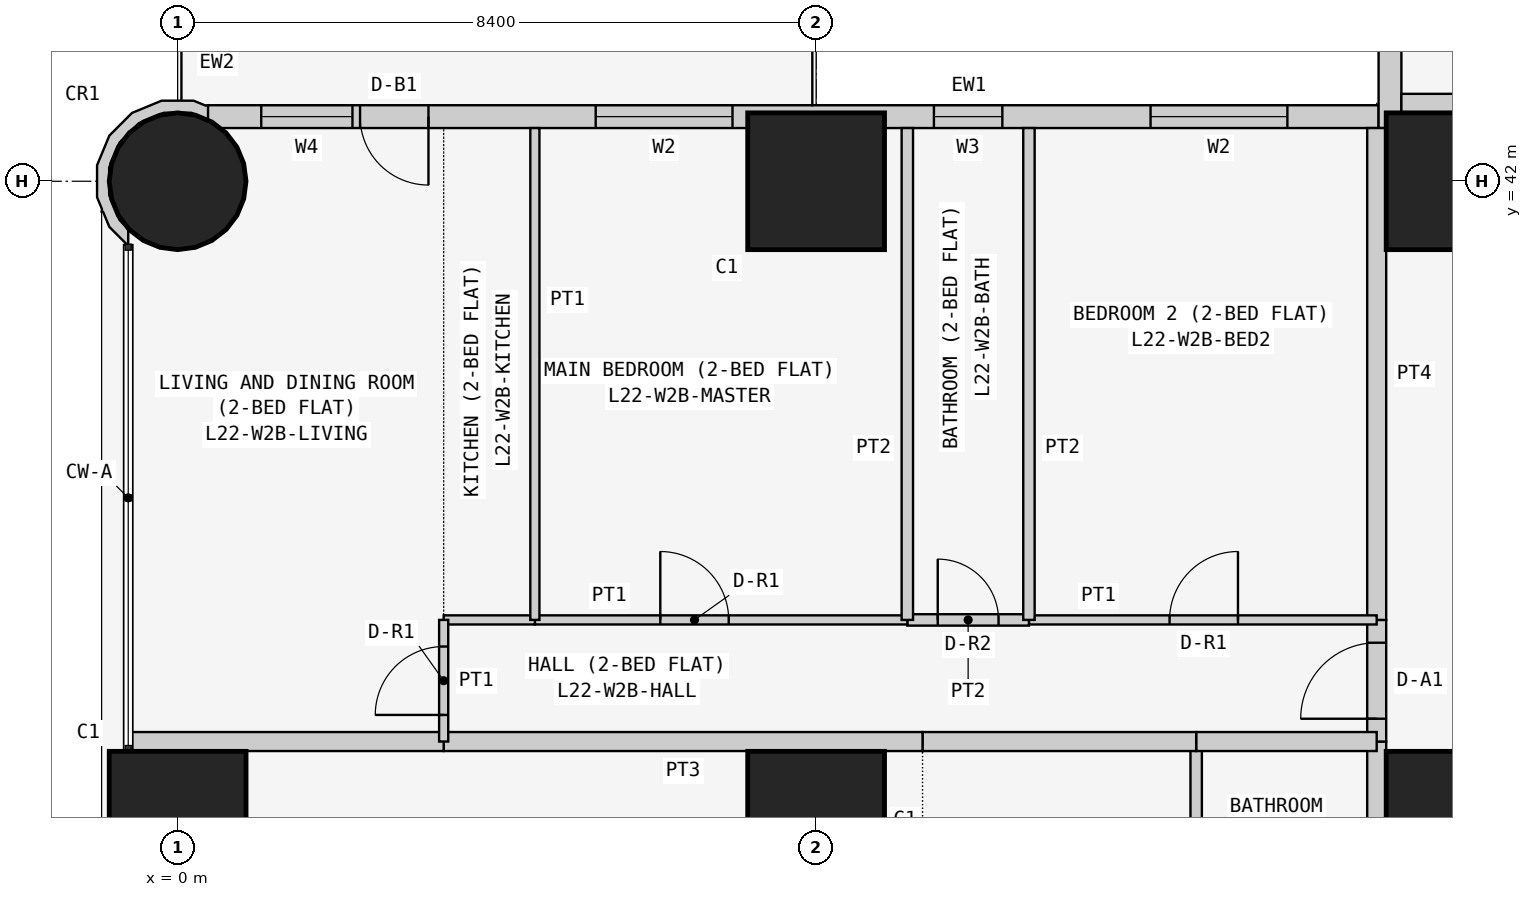
"""IFC4 building model, lengths in metres.
Left out: names, types, materials, properties, quantities, classifications, styles, units other than length and angle.
Written with IfcOpenShell. Run it as: python <this file> out.ifc"""

import sys

from ifc_helpers import new_model, si_unit, direction, frame, frame_2d, origin, origin_2d, place, context, subcontext, project, spatial, polyline, rectangle, circle, outline, extrude, element, fill, save


model = new_model("IFC4")
c1 = context("Model", 3, precision=1e-05, world=origin(), true_north=direction((0.0, 1.0)))
c2 = subcontext(c1, "Body", "Model", "MODEL_VIEW")
j1 = project(units=[si_unit("LENGTHUNIT", "METRE"), si_unit("PLANEANGLEUNIT", "RADIAN")], contexts=[c1])
p1 = place(None, origin())
s1 = spatial("IfcSite", under=j1, at=p1, CompositionType="ELEMENT")
p2 = place(p1, origin())
s2 = spatial("IfcBuilding", under=s1, at=p2, CompositionType="ELEMENT")
p3 = place(p2, frame((0.0, 0.0, 88.5)))
s3 = spatial("IfcBuildingStorey", under=s2, at=p3, CompositionType="ELEMENT", Elevation=88.5)
p4 = place(p3, frame((0.0, 33.6, 0.0), z_axis=(0.0, 0.0, 1.0), x_axis=(1.0, 0.0, 0.0)))
e1 = element("IfcColumn", 1, at=p4, inside=s3, PredefinedType="COLUMN", context=c2, shape_type="SweptSolid", body=[
    extrude(rectangle(XDim=1.8, YDim=1.8, at=origin_2d()), origin(), (0.0, 0.0, 1.0), 3.6),
])
p5 = place(p3, frame((0.0, 42.0, 0.0), z_axis=(0.0, 0.0, 1.0), x_axis=(1.0, 0.0, 0.0)))
e2 = element("IfcColumn", 2, at=p5, inside=s3, PredefinedType="COLUMN", context=c2, shape_type="SweptSolid", body=[
    extrude(circle(Radius=0.9, at=origin_2d()), origin(), (0.0, 0.0, 1.0), 3.6),
])
for number, where, z_axis, x_axis in (
    (3, (8.4, 33.6, 0.0), (0.0, 0.0, 1.0), (1.0, 0.0, 0.0)),
    (4, (8.4, 42.0, 0.0), (0.0, 0.0, 1.0), (1.0, 0.0, 0.0)),
    (5, (16.8, 33.6, 0.0), (0.0, 0.0, 1.0), (1.0, 0.0, 0.0)),
    (6, (16.8, 42.0, 0.0), (0.0, 0.0, 1.0), (1.0, 0.0, 0.0)),
):
    element("IfcColumn", number, at=place(p3, frame(where, z_axis=z_axis, x_axis=x_axis)), inside=s3, PredefinedType="COLUMN", context=c2, shape_type="SweptSolid", body=[
        extrude(rectangle(XDim=1.8, YDim=1.8, at=origin_2d()), origin(), (0.0, 0.0, 1.0), 3.6),
    ])
p6 = place(p3, frame((15.8, 42.85, 0.0), z_axis=(0.0, 0.0, 1.0), x_axis=(-1.0, 0.0, 0.0)))
e7 = element("IfcWall", 7, at=p6, inside=s3, PredefinedType="SOLIDWALL", context=c2, shape_type="SweptSolid", body=[
    extrude(rectangle(XDim=15.4, YDim=0.3, at=frame_2d((7.7, 0.0))), origin(), (0.0, 0.0, 1.0), 3.45),
])
p7 = place(p6, frame((1.2, 0.0, 0.9)))
e8 = element("IfcOpeningElement", 8, at=p7, cuts=e7, PredefinedType="OPENING", context=c2, shape_type="SweptSolid", body=[
    extrude(rectangle(XDim=1.8, YDim=1.5, at=frame_2d((0.9, 0.75))), frame((0.0, 0.16, 0.0), z_axis=(0.0, -1.0, 0.0), x_axis=(1.0, 0.0, 0.0)), (0.0, 0.0, 1.0), 0.32),
])
p8 = place(p6, frame((4.95, 0.0, 1.5)))
e9 = element("IfcOpeningElement", 9, at=p8, cuts=e7, PredefinedType="OPENING", context=c2, shape_type="SweptSolid", body=[
    extrude(rectangle(XDim=0.9, YDim=0.7, at=frame_2d((0.45, 0.35))), frame((0.0, 0.16, 0.0), z_axis=(0.0, -1.0, 0.0), x_axis=(1.0, 0.0, 0.0)), (0.0, 0.0, 1.0), 0.32),
])
p9 = place(p6, frame((8.5, 0.0, 0.9)))
e10 = element("IfcOpeningElement", 10, at=p9, cuts=e7, PredefinedType="OPENING", context=c2, shape_type="SweptSolid", body=[
    extrude(rectangle(XDim=1.8, YDim=1.5, at=frame_2d((0.9, 0.75))), frame((0.0, 0.16, 0.0), z_axis=(0.0, -1.0, 0.0), x_axis=(1.0, 0.0, 0.0)), (0.0, 0.0, 1.0), 0.32),
])
p10 = place(p6, frame((12.5, 0.0, 0.0)))
e11 = element("IfcOpeningElement", 11, at=p10, cuts=e7, PredefinedType="OPENING", context=c2, shape_type="SweptSolid", body=[
    extrude(rectangle(XDim=0.9, YDim=2.4, at=frame_2d((0.45, 1.2))), frame((0.0, 0.16, 0.0), z_axis=(0.0, -1.0, 0.0), x_axis=(1.0, 0.0, 0.0)), (0.0, 0.0, 1.0), 0.32),
])
p11 = place(p6, frame((13.5, 0.0, 0.9)))
e12 = element("IfcOpeningElement", 12, at=p11, cuts=e7, PredefinedType="OPENING", context=c2, shape_type="SweptSolid", body=[
    extrude(rectangle(XDim=1.2, YDim=1.5, at=frame_2d((0.6, 0.75))), frame((0.0, 0.16, 0.0), z_axis=(0.0, -1.0, 0.0), x_axis=(1.0, 0.0, 0.0)), (0.0, 0.0, 1.0), 0.32),
])
p12 = place(p3, frame((15.95, 58.4, 0.0), z_axis=(0.0, 0.0, 1.0), x_axis=(0.0, -1.0, 0.0)))
e13 = element("IfcWall", 13, at=p12, inside=s3, PredefinedType="SOLIDWALL", context=c2, shape_type="SweptSolid", body=[
    extrude(rectangle(XDim=15.7, YDim=0.3, at=frame_2d((7.85, 0.0))), origin(), (0.0, 0.0, 1.0), 3.45),
])
p13 = place(p12, frame((12.4, 0.0, 0.9)))
e14 = element("IfcOpeningElement", 14, at=p13, cuts=e13, PredefinedType="OPENING", context=c2, shape_type="SweptSolid", body=[
    extrude(rectangle(XDim=1.8, YDim=1.5, at=frame_2d((0.9, 0.75))), frame((0.0, 0.16, 0.0), z_axis=(0.0, -1.0, 0.0), x_axis=(1.0, 0.0, 0.0)), (0.0, 0.0, 1.0), 0.32),
])
p14 = place(p12, frame((9.55, 0.0, 1.5)))
e15 = element("IfcOpeningElement", 15, at=p14, cuts=e13, PredefinedType="OPENING", context=c2, shape_type="SweptSolid", body=[
    extrude(rectangle(XDim=0.9, YDim=0.7, at=frame_2d((0.45, 0.35))), frame((0.0, 0.16, 0.0), z_axis=(0.0, -1.0, 0.0), x_axis=(1.0, 0.0, 0.0)), (0.0, 0.0, 1.0), 0.32),
])
p15 = place(p12, frame((5.1, 0.0, 0.9)))
e16 = element("IfcOpeningElement", 16, at=p15, cuts=e13, PredefinedType="OPENING", context=c2, shape_type="SweptSolid", body=[
    extrude(rectangle(XDim=1.8, YDim=1.5, at=frame_2d((0.9, 0.75))), frame((0.0, 0.16, 0.0), z_axis=(0.0, -1.0, 0.0), x_axis=(1.0, 0.0, 0.0)), (0.0, 0.0, 1.0), 0.32),
])
p16 = place(p12, frame((2.0, 0.0, 0.0)))
e17 = element("IfcOpeningElement", 17, at=p16, cuts=e13, PredefinedType="OPENING", context=c2, shape_type="SweptSolid", body=[
    extrude(rectangle(XDim=0.9, YDim=2.4, at=frame_2d((0.45, 1.2))), frame((0.0, 0.16, 0.0), z_axis=(0.0, -1.0, 0.0), x_axis=(1.0, 0.0, 0.0)), (0.0, 0.0, 1.0), 0.32),
])
p17 = place(p12, frame((0.7, 0.0, 0.9)))
e18 = element("IfcOpeningElement", 18, at=p17, cuts=e13, PredefinedType="OPENING", context=c2, shape_type="SweptSolid", body=[
    extrude(rectangle(XDim=1.2, YDim=1.5, at=frame_2d((0.6, 0.75))), frame((0.0, 0.16, 0.0), z_axis=(0.0, -1.0, 0.0), x_axis=(1.0, 0.0, 0.0)), (0.0, 0.0, 1.0), 0.32),
])
p18 = place(p3, frame((0.364, 42.91, 0.0), z_axis=(0.0, 0.0, 1.0), x_axis=(-0.926129809145, 0.377204953059, 0.0)))
e19 = element("IfcWall", 19, at=p18, inside=s3, PredefinedType="SOLIDWALL", context=c2, shape_type="SweptSolid", body=[
    extrude(outline(polyline([(0.36, 1.803), (0.509, 1.741), (0.761, 1.486), (0.896, 1.154), (0.894, 0.795), (0.755, 0.465), (0.5, 0.213), (0.168, 0.078), (-0.1, 0.08), (0.001, -0.097), (0.03, -0.08), (0.199, -0.081), (0.589, 0.078), (0.889, 0.374), (1.053, 0.763), (1.055, 1.185), (0.896, 1.575), (0.778, 1.695), (0.769, 1.728), (0.75, 1.723), (0.6, 1.875), (0.295, 2.003), (0.281, 1.998), (0.36, 1.803)])), origin(), (0.0, 0.0, 1.0), 3.45),
])
p19 = place(p3, frame((16.1, 43.025, 0.0), z_axis=(0.0, 0.0, 1.0), x_axis=(1.0, 0.0, 0.0)))
e20 = element("IfcWall", 20, at=p19, inside=s3, PredefinedType="PARTITIONING", context=c2, shape_type="SweptSolid", body=[
    extrude(rectangle(XDim=6.471, YDim=0.25, at=frame_2d((3.235, 0.0))), origin(), (0.0, 0.0, 1.0), 3.45),
])
p20 = place(p3, frame((15.775, 32.0, 0.0), z_axis=(0.0, 0.0, 1.0), x_axis=(0.0, 1.0, 0.0)))
e21 = element("IfcWall", 21, at=p20, inside=s3, PredefinedType="PARTITIONING", context=c2, shape_type="SweptSolid", body=[
    extrude(rectangle(XDim=2.629, YDim=0.25, at=frame_2d((1.314, 0.0))), origin(), (0.0, 0.0, 1.0), 3.45),
])
p21 = place(p3, frame((15.775, 34.629, 0.0), z_axis=(0.0, 0.0, 1.0), x_axis=(0.0, 1.0, 0.0)))
e22 = element("IfcWall", 22, at=p21, inside=s3, PredefinedType="PARTITIONING", context=c2, shape_type="SweptSolid", body=[
    extrude(rectangle(XDim=1.6, YDim=0.25, at=frame_2d((0.8, 0.0))), origin(), (0.0, 0.0, 1.0), 3.45),
])
p22 = place(p21, frame((0.3, 0.0, 0.0)))
e23 = element("IfcOpeningElement", 23, at=p22, cuts=e22, PredefinedType="OPENING", context=c2, shape_type="SweptSolid", body=[
    extrude(rectangle(XDim=1.0, YDim=2.1, at=frame_2d((0.5, 1.05))), frame((0.0, 0.135, 0.0), z_axis=(0.0, -1.0, 0.0), x_axis=(1.0, 0.0, 0.0)), (0.0, 0.0, 1.0), 0.27),
])
p23 = place(p3, frame((15.775, 36.229, 0.0), z_axis=(0.0, 0.0, 1.0), x_axis=(0.0, 1.0, 0.0)))
e24 = element("IfcWall", 24, at=p23, inside=s3, PredefinedType="PARTITIONING", context=c2, shape_type="SweptSolid", body=[
    extrude(rectangle(XDim=6.471, YDim=0.25, at=frame_2d((3.235, 0.0))), origin(), (0.0, 0.0, 1.0), 3.45),
])
p24 = place(p3, frame((13.4, 32.0, 0.0), z_axis=(0.0, 0.0, 1.0), x_axis=(0.0, 1.0, 0.0)))
e25 = element("IfcWall", 25, at=p24, inside=s3, PredefinedType="PARTITIONING", context=c2, shape_type="SweptSolid", body=[
    extrude(rectangle(XDim=2.629, YDim=0.15, at=frame_2d((1.314, 0.0))), origin(), (0.0, 0.0, 1.0), 3.45),
])
p25 = place(p3, frame((13.4, 34.629, 0.0), z_axis=(0.0, 0.0, 1.0), x_axis=(1.0, 0.0, 0.0)))
e26 = element("IfcWall", 26, at=p25, inside=s3, PredefinedType="PARTITIONING", context=c2, shape_type="SweptSolid", body=[
    extrude(rectangle(XDim=2.375, YDim=0.25, at=frame_2d((1.188, 0.0))), origin(), (0.0, 0.0, 1.0), 3.45),
])
p26 = place(p3, frame((9.8, 34.629, 0.0), z_axis=(0.0, 0.0, 1.0), x_axis=(1.0, 0.0, 0.0)))
e27 = element("IfcWall", 27, at=p26, inside=s3, PredefinedType="PARTITIONING", context=c2, shape_type="SweptSolid", body=[
    extrude(rectangle(XDim=3.6, YDim=0.25, at=frame_2d((1.8, 0.0))), origin(), (0.0, 0.0, 1.0), 3.45),
])
p27 = place(p3, frame((3.5, 34.629, 0.0), z_axis=(0.0, 0.0, 1.0), x_axis=(1.0, 0.0, 0.0)))
e28 = element("IfcWall", 28, at=p27, inside=s3, PredefinedType="PARTITIONING", context=c2, shape_type="SweptSolid", body=[
    extrude(rectangle(XDim=6.3, YDim=0.25, at=frame_2d((3.15, 0.0))), origin(), (0.0, 0.0, 1.0), 3.45),
])
p28 = place(p3, frame((-0.65, 34.629, 0.0), z_axis=(0.0, 0.0, 1.0), x_axis=(1.0, 0.0, 0.0)))
e29 = element("IfcWall", 29, at=p28, inside=s3, PredefinedType="PARTITIONING", context=c2, shape_type="SweptSolid", body=[
    extrude(rectangle(XDim=4.15, YDim=0.25, at=frame_2d((2.075, 0.0))), origin(), (0.0, 0.0, 1.0), 3.45),
])
p29 = place(p3, frame((11.2, 36.229, 0.0), z_axis=(0.0, 0.0, 1.0), x_axis=(1.0, 0.0, 0.0)))
e30 = element("IfcWall", 30, at=p29, inside=s3, PredefinedType="PARTITIONING", context=c2, shape_type="SweptSolid", body=[
    extrude(rectangle(XDim=4.575, YDim=0.12, at=frame_2d((2.288, 0.0))), origin(), (0.0, 0.0, 1.0), 3.45),
])
p30 = place(p29, frame((1.85, 0.0, 0.0)))
e31 = element("IfcOpeningElement", 31, at=p30, cuts=e30, PredefinedType="OPENING", context=c2, shape_type="SweptSolid", body=[
    extrude(rectangle(XDim=0.9, YDim=2.1, at=frame_2d((0.45, 1.05))), frame((0.0, 0.07, 0.0), z_axis=(0.0, -1.0, 0.0), x_axis=(1.0, 0.0, 0.0)), (0.0, 0.0, 1.0), 0.14),
])
p31 = place(p3, frame((9.6, 36.229, 0.0), z_axis=(0.0, 0.0, 1.0), x_axis=(1.0, 0.0, 0.0)))
e32 = element("IfcWall", 32, at=p31, inside=s3, PredefinedType="PARTITIONING", context=c2, shape_type="SweptSolid", body=[
    extrude(rectangle(XDim=1.6, YDim=0.15, at=frame_2d((0.8, 0.0))), origin(), (0.0, 0.0, 1.0), 3.45),
])
p32 = place(p31, frame((0.4, 0.0, 0.0)))
e33 = element("IfcOpeningElement", 33, at=p32, cuts=e32, PredefinedType="OPENING", context=c2, shape_type="SweptSolid", body=[
    extrude(rectangle(XDim=0.8, YDim=2.1, at=frame_2d((0.4, 1.05))), frame((0.0, 0.085, 0.0), z_axis=(0.0, -1.0, 0.0), x_axis=(1.0, 0.0, 0.0)), (0.0, 0.0, 1.0), 0.17),
])
p33 = place(p3, frame((4.7, 36.229, 0.0), z_axis=(0.0, 0.0, 1.0), x_axis=(1.0, 0.0, 0.0)))
e34 = element("IfcWall", 34, at=p33, inside=s3, PredefinedType="PARTITIONING", context=c2, shape_type="SweptSolid", body=[
    extrude(rectangle(XDim=4.9, YDim=0.12, at=frame_2d((2.45, 0.0))), origin(), (0.0, 0.0, 1.0), 3.45),
])
p34 = place(p33, frame((1.65, 0.0, 0.0)))
e35 = element("IfcOpeningElement", 35, at=p34, cuts=e34, PredefinedType="OPENING", context=c2, shape_type="SweptSolid", body=[
    extrude(rectangle(XDim=0.9, YDim=2.1, at=frame_2d((0.45, 1.05))), frame((0.0, 0.07, 0.0), z_axis=(0.0, -1.0, 0.0), x_axis=(1.0, 0.0, 0.0)), (0.0, 0.0, 1.0), 0.14),
])
p35 = place(p3, frame((3.5, 36.229, 0.0), z_axis=(0.0, 0.0, 1.0), x_axis=(1.0, 0.0, 0.0)))
e36 = element("IfcWall", 36, at=p35, inside=s3, PredefinedType="PARTITIONING", context=c2, shape_type="SweptSolid", body=[
    extrude(rectangle(XDim=1.2, YDim=0.12, at=frame_2d((0.6, 0.0))), origin(), (0.0, 0.0, 1.0), 3.45),
])
p36 = place(p3, frame((3.5, 34.629, 0.0), z_axis=(0.0, 0.0, 1.0), x_axis=(0.0, 1.0, 0.0)))
e37 = element("IfcWall", 37, at=p36, inside=s3, PredefinedType="PARTITIONING", context=c2, shape_type="SweptSolid", body=[
    extrude(rectangle(XDim=1.6, YDim=0.12, at=frame_2d((0.8, 0.0))), origin(), (0.0, 0.0, 1.0), 3.45),
])
p37 = place(p36, frame((0.35, 0.0, 0.0)))
e38 = element("IfcOpeningElement", 38, at=p37, cuts=e37, PredefinedType="OPENING", context=c2, shape_type="SweptSolid", body=[
    extrude(rectangle(XDim=0.9, YDim=2.1, at=frame_2d((0.45, 1.05))), frame((0.0, 0.07, 0.0), z_axis=(0.0, -1.0, 0.0), x_axis=(1.0, 0.0, 0.0)), (0.0, 0.0, 1.0), 0.14),
])
for number, where, z_axis, x_axis in (
    (39, (11.2, 36.229, 0.0), (0.0, 0.0, 1.0), (0.0, 1.0, 0.0)),
    (40, (9.6, 36.229, 0.0), (0.0, 0.0, 1.0), (0.0, 1.0, 0.0)),
):
    element("IfcWall", number, at=place(p3, frame(where, z_axis=z_axis, x_axis=x_axis)), inside=s3, PredefinedType="PARTITIONING", context=c2, shape_type="SweptSolid", body=[
        extrude(rectangle(XDim=6.471, YDim=0.15, at=frame_2d((3.235, 0.0))), origin(), (0.0, 0.0, 1.0), 3.45),
    ])
p38 = place(p3, frame((4.7, 36.229, 0.0), z_axis=(0.0, 0.0, 1.0), x_axis=(0.0, 1.0, 0.0)))
e41 = element("IfcWall", 41, at=p38, inside=s3, PredefinedType="PARTITIONING", context=c2, shape_type="SweptSolid", body=[
    extrude(rectangle(XDim=6.471, YDim=0.12, at=frame_2d((3.235, 0.0))), origin(), (0.0, 0.0, 1.0), 3.45),
])
p39 = place(p7, origin())
e42 = element("IfcWindow", 42, at=p39, inside=s3, PartitioningType="SINGLE_PANEL", PredefinedType="WINDOW", context=c2, shape_type="SweptSolid", body=[
    extrude(rectangle(XDim=1.8, YDim=1.5, at=frame_2d((0.9, 0.75))), frame((0.0, 0.03, 0.0), z_axis=(0.0, -1.0, 0.0), x_axis=(1.0, 0.0, 0.0)), (0.0, 0.0, 1.0), 0.06),
])
fill(e8, e42)
p40 = place(p8, origin())
e43 = element("IfcWindow", 43, at=p40, inside=s3, PartitioningType="SINGLE_PANEL", PredefinedType="WINDOW", context=c2, shape_type="SweptSolid", body=[
    extrude(rectangle(XDim=0.9, YDim=0.7, at=frame_2d((0.45, 0.35))), frame((0.0, 0.03, 0.0), z_axis=(0.0, -1.0, 0.0), x_axis=(1.0, 0.0, 0.0)), (0.0, 0.0, 1.0), 0.06),
])
fill(e9, e43)
p41 = place(p9, origin())
e44 = element("IfcWindow", 44, at=p41, inside=s3, PartitioningType="SINGLE_PANEL", PredefinedType="WINDOW", context=c2, shape_type="SweptSolid", body=[
    extrude(rectangle(XDim=1.8, YDim=1.5, at=frame_2d((0.9, 0.75))), frame((0.0, 0.03, 0.0), z_axis=(0.0, -1.0, 0.0), x_axis=(1.0, 0.0, 0.0)), (0.0, 0.0, 1.0), 0.06),
])
fill(e10, e44)
p42 = place(p10, origin())
e45 = element("IfcDoor", 45, at=p42, inside=s3, OperationType="SINGLE_SWING_LEFT", PredefinedType="DOOR", context=c2, shape_type="SweptSolid", body=[
    extrude(rectangle(XDim=0.9, YDim=2.4, at=frame_2d((0.45, 1.2))), frame((0.0, 0.025, 0.0), z_axis=(0.0, -1.0, 0.0), x_axis=(1.0, 0.0, 0.0)), (0.0, 0.0, 1.0), 0.05),
])
fill(e11, e45)
p43 = place(p11, origin())
e46 = element("IfcWindow", 46, at=p43, inside=s3, PartitioningType="SINGLE_PANEL", PredefinedType="WINDOW", context=c2, shape_type="SweptSolid", body=[
    extrude(rectangle(XDim=1.2, YDim=1.5, at=frame_2d((0.6, 0.75))), frame((0.0, 0.03, 0.0), z_axis=(0.0, -1.0, 0.0), x_axis=(1.0, 0.0, 0.0)), (0.0, 0.0, 1.0), 0.06),
])
fill(e12, e46)
p44 = place(p22, origin())
e47 = element("IfcDoor", 47, at=p44, inside=s3, OperationType="SINGLE_SWING_LEFT", PredefinedType="DOOR", context=c2, shape_type="SweptSolid", body=[
    extrude(rectangle(XDim=1.0, YDim=2.1, at=frame_2d((0.5, 1.05))), frame((0.0, 0.025, 0.0), z_axis=(0.0, -1.0, 0.0), x_axis=(1.0, 0.0, 0.0)), (0.0, 0.0, 1.0), 0.05),
])
fill(e23, e47)
p45 = place(p30, origin())
e48 = element("IfcDoor", 48, at=p45, inside=s3, OperationType="SINGLE_SWING_RIGHT", PredefinedType="DOOR", context=c2, shape_type="SweptSolid", body=[
    extrude(rectangle(XDim=0.9, YDim=2.1, at=frame_2d((0.45, 1.05))), frame((0.0, 0.025, 0.0), z_axis=(0.0, -1.0, 0.0), x_axis=(1.0, 0.0, 0.0)), (0.0, 0.0, 1.0), 0.05),
])
fill(e31, e48)
p46 = place(p32, origin())
e49 = element("IfcDoor", 49, at=p46, inside=s3, OperationType="SINGLE_SWING_LEFT", PredefinedType="DOOR", context=c2, shape_type="SweptSolid", body=[
    extrude(rectangle(XDim=0.8, YDim=2.1, at=frame_2d((0.4, 1.05))), frame((0.0, 0.025, 0.0), z_axis=(0.0, -1.0, 0.0), x_axis=(1.0, 0.0, 0.0)), (0.0, 0.0, 1.0), 0.05),
])
fill(e33, e49)
p47 = place(p34, origin())
e50 = element("IfcDoor", 50, at=p47, inside=s3, OperationType="SINGLE_SWING_LEFT", PredefinedType="DOOR", context=c2, shape_type="SweptSolid", body=[
    extrude(rectangle(XDim=0.9, YDim=2.1, at=frame_2d((0.45, 1.05))), frame((0.0, 0.025, 0.0), z_axis=(0.0, -1.0, 0.0), x_axis=(1.0, 0.0, 0.0)), (0.0, 0.0, 1.0), 0.05),
])
fill(e35, e50)
p48 = place(p37, origin())
e51 = element("IfcDoor", 51, at=p48, inside=s3, OperationType="SINGLE_SWING_LEFT", PredefinedType="DOOR", context=c2, shape_type="SweptSolid", body=[
    extrude(rectangle(XDim=0.9, YDim=2.1, at=frame_2d((0.45, 1.05))), frame((0.0, 0.025, 0.0), z_axis=(0.0, -1.0, 0.0), x_axis=(1.0, 0.0, 0.0)), (0.0, 0.0, 1.0), 0.05),
])
fill(e38, e51)
save(model, sys.argv[1])
